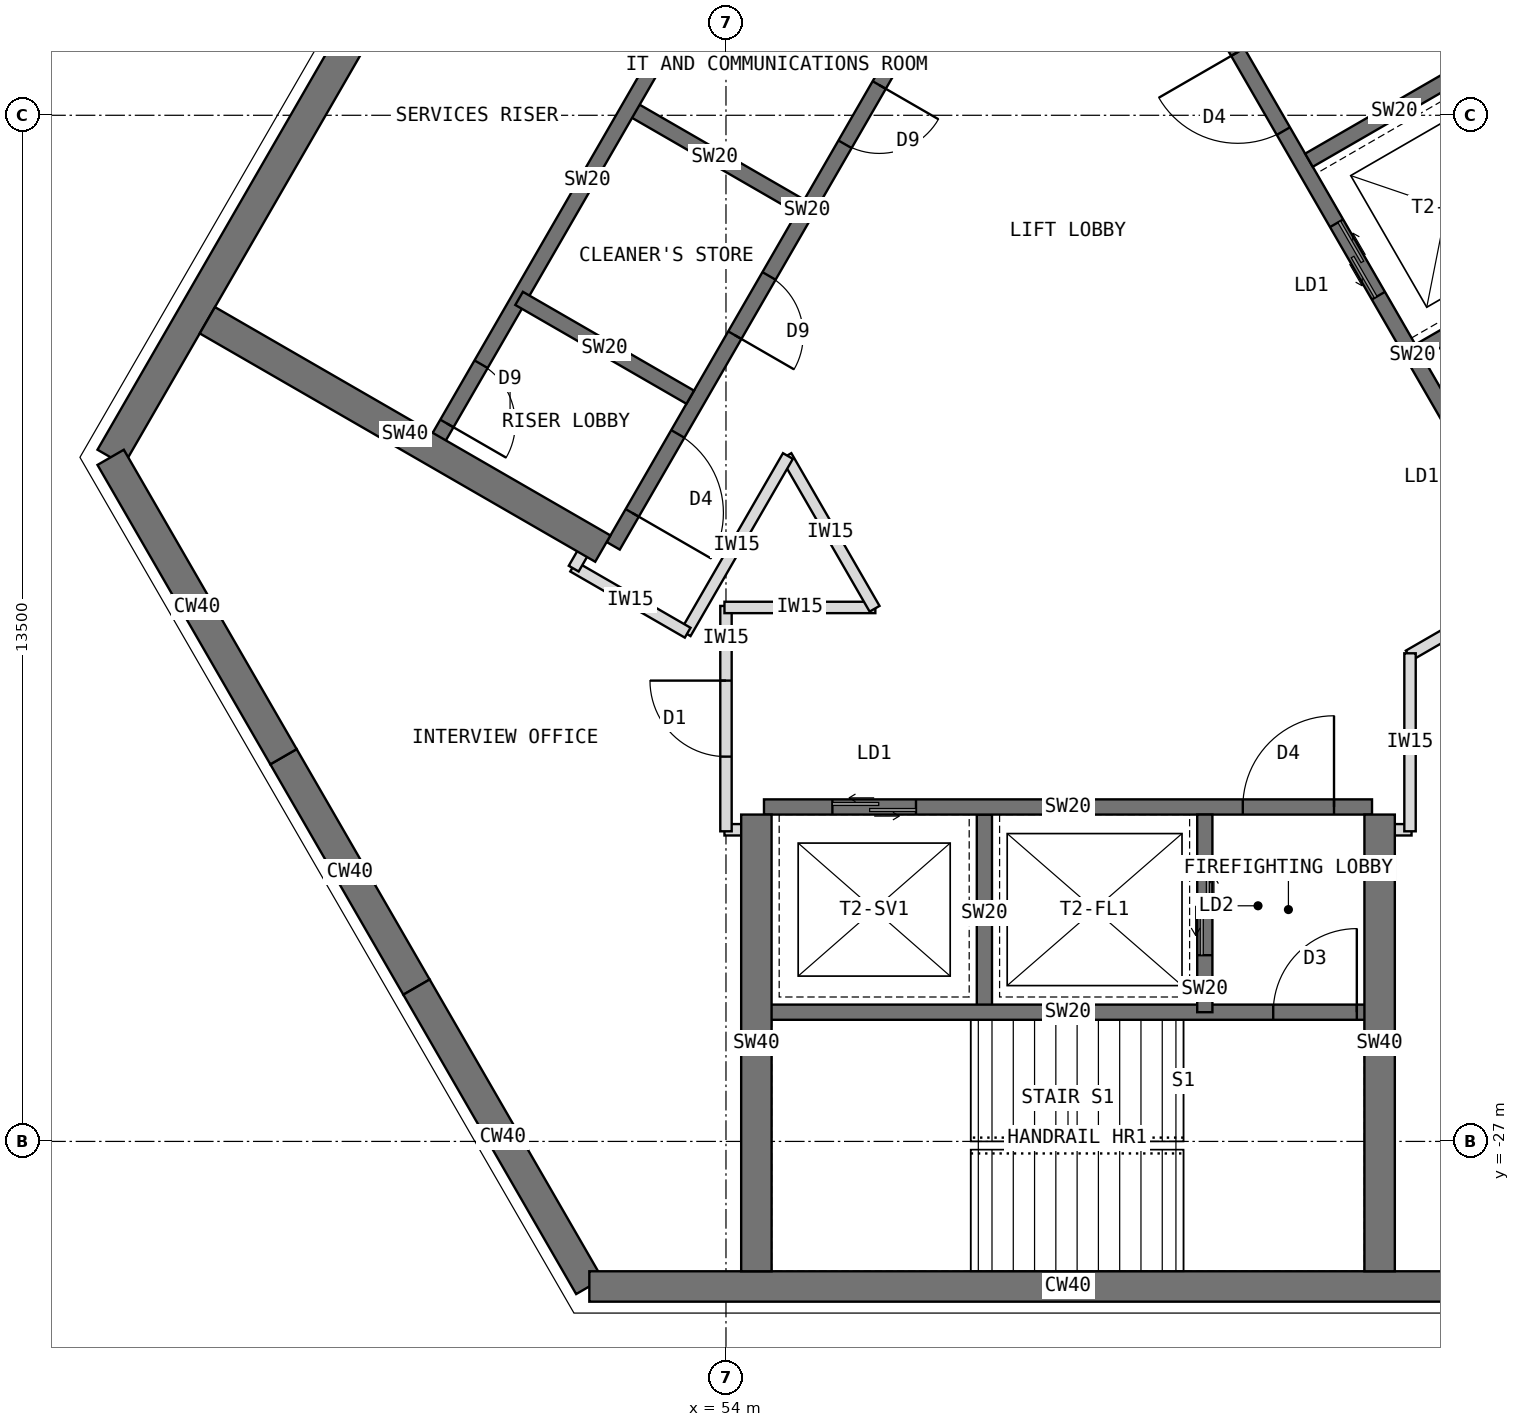
"""IFC4 building model, lengths in metres.
Left out: names, types, materials, properties, quantities, classifications, styles, units other than length and angle.
Written with IfcOpenShell. Run it as: python <this file> out.ifc"""

import sys

from ifc_helpers import new_model, si_unit, direction, frame, frame_2d, origin, place, context, subcontext, project, spatial, rectangle, extrude, element, fill, save


model = new_model("IFC4")
c1 = context("Model", 3, precision=1e-05, world=origin(), true_north=direction((0.0, 1.0)))
c2 = subcontext(c1, "Body", "Model", "MODEL_VIEW")
j1 = project(units=[si_unit("LENGTHUNIT", "METRE"), si_unit("PLANEANGLEUNIT", "RADIAN")], contexts=[c1])
p1 = place(None, origin())
s1 = spatial("IfcSite", under=j1, at=p1, CompositionType="ELEMENT")
p2 = place(p1, origin())
s2 = spatial("IfcBuilding", under=s1, at=p2, CompositionType="ELEMENT")
p3 = place(p2, frame((0.0, 0.0, 251.5)))
s3 = spatial("IfcBuildingStorey", under=s2, at=p3, CompositionType="ELEMENT", Elevation=251.5)
p4 = place(p3, frame((52.202, -7.092, 0.0), z_axis=(0.0, 0.0, 1.0), x_axis=(-0.500005998175, -0.866021940709, 0.0)))
e1 = element("IfcWall", 1, at=p4, inside=s3, PredefinedType="SHEAR", context=c2, shape_type="SweptSolid", body=[
    extrude(rectangle(XDim=12.596, YDim=0.4, at=frame_2d((6.298, 0.0))), origin(), (0.0, 0.0, 1.0), 4.0),
])
p5 = place(p3, frame((45.904, -18.0, 0.0), z_axis=(0.0, 0.0, 1.0), x_axis=(0.500024481964, -0.866011268655, 0.0)))
e2 = element("IfcWall", 2, at=p5, inside=s3, PredefinedType="SHEAR", context=c2, shape_type="SweptSolid", body=[
    extrude(rectangle(XDim=4.548, YDim=0.4, at=frame_2d((2.274, 0.0))), origin(), (0.0, 0.0, 1.0), 4.0),
])
p6 = place(p3, frame((48.178, -21.939, 0.0), z_axis=(0.0, 0.0, 1.0), x_axis=(0.500010275428, -0.866019471182, 0.0)))
e3 = element("IfcWall", 3, at=p6, inside=s3, PredefinedType="SHEAR", context=c2, shape_type="SweptSolid", body=[
    extrude(rectangle(XDim=3.5, YDim=0.4, at=frame_2d((1.75, 0.0))), origin(), (0.0, 0.0, 1.0), 4.0),
])
p7 = place(p3, frame((49.928, -24.97, 0.0), z_axis=(0.0, 0.0, 1.0), x_axis=(0.499984222037, -0.866034513004, 0.0)))
e4 = element("IfcWall", 4, at=p7, inside=s3, PredefinedType="SHEAR", context=c2, shape_type="SweptSolid", body=[
    extrude(rectangle(XDim=4.548, YDim=0.4, at=frame_2d((2.274, 0.0))), origin(), (0.0, 0.0, 1.0), 4.0),
])
p8 = place(p3, frame((52.202, -28.908, 0.0), z_axis=(0.0, 0.0, 1.0), x_axis=(1.0, 0.0, 0.0)))
e5 = element("IfcWall", 5, at=p8, inside=s3, PredefinedType="SHEAR", context=c2, shape_type="SweptSolid", body=[
    extrude(rectangle(XDim=12.596, YDim=0.4, at=frame_2d((6.298, 0.0))), origin(), (0.0, 0.0, 1.0), 4.0),
])
p9 = place(p3, frame((56.516, -12.236, 0.0), z_axis=(0.0, 0.0, 1.0), x_axis=(-0.49999894854, -0.866026010844, 0.0)))
e6 = element("IfcWall", 6, at=p9, inside=s3, PredefinedType="SHEAR", context=c2, shape_type="SweptSolid", body=[
    extrude(rectangle(XDim=8.0, YDim=0.2, at=frame_2d((4.0, 0.0))), origin(), (0.0, 0.0, 1.0), 4.0),
])
p10 = place(p9, frame((6.3, 0.0, 0.0)))
e7 = element("IfcOpeningElement", 7, at=p10, cuts=e6, PredefinedType="OPENING", context=c2, shape_type="SweptSolid", body=[
    extrude(rectangle(XDim=1.2, YDim=2.1, at=frame_2d((0.6, 1.05))), frame((0.0, 0.11, 0.0), z_axis=(0.0, -1.0, 0.0), x_axis=(1.0, 0.0, 0.0)), (0.0, 0.0, 1.0), 0.22),
])
p11 = place(p9, frame((1.0, 0.0, 0.0)))
e8 = element("IfcOpeningElement", 8, at=p11, cuts=e6, PredefinedType="OPENING", context=c2, shape_type="SweptSolid", body=[
    extrude(rectangle(XDim=0.9, YDim=2.1, at=frame_2d((0.45, 1.05))), frame((0.0, 0.11, 0.0), z_axis=(0.0, -1.0, 0.0), x_axis=(1.0, 0.0, 0.0)), (0.0, 0.0, 1.0), 0.22),
])
p12 = place(p9, frame((3.9, 0.0, 0.0)))
e9 = element("IfcOpeningElement", 9, at=p12, cuts=e6, PredefinedType="OPENING", context=c2, shape_type="SweptSolid", body=[
    extrude(rectangle(XDim=0.9, YDim=2.1, at=frame_2d((0.45, 1.05))), frame((0.0, 0.11, 0.0), z_axis=(0.0, -1.0, 0.0), x_axis=(1.0, 0.0, 0.0)), (0.0, 0.0, 1.0), 0.22),
])
for number, where, z_axis, x_axis in (
    (10, (54.98, -14.697, 0.0), (0.0, 0.0, 1.0), (-0.866, 0.5, 0.0)),
    (11, (53.53, -17.209, 0.0), (0.0, 0.0, 1.0), (-0.866, 0.5, 0.0)),
):
    element("IfcWall", number, at=place(p3, frame(where, z_axis=z_axis, x_axis=x_axis)), inside=s3, PredefinedType="SHEAR", context=c2, shape_type="SweptSolid", body=[
        extrude(rectangle(XDim=2.6, YDim=0.2, at=frame_2d((1.3, 0.0))), origin(), (0.0, 0.0, 1.0), 4.0),
    ])
p13 = place(p3, frame((54.178, -10.886, 0.0), z_axis=(0.0, 0.0, 1.0), x_axis=(-0.49999894854, -0.866026010844, 0.0)))
e12 = element("IfcWall", 12, at=p13, inside=s3, PredefinedType="SHEAR", context=c2, shape_type="SweptSolid", body=[
    extrude(rectangle(XDim=8.0, YDim=0.2, at=frame_2d((4.0, 0.0))), origin(), (0.0, 0.0, 1.0), 4.0),
])
p14 = place(p13, frame((6.8, 0.0, 0.0)))
e13 = element("IfcOpeningElement", 13, at=p14, cuts=e12, PredefinedType="OPENING", context=c2, shape_type="SweptSolid", body=[
    extrude(rectangle(XDim=0.9, YDim=2.1, at=frame_2d((0.45, 1.05))), frame((0.0, 0.11, 0.0), z_axis=(0.0, -1.0, 0.0), x_axis=(1.0, 0.0, 0.0)), (0.0, 0.0, 1.0), 0.22),
])
p15 = place(p3, frame((52.38, -19.201, 0.0), z_axis=(0.0, 0.0, 1.0), x_axis=(-0.866026570101, 0.499997979876, 0.0)))
e14 = element("IfcWall", 14, at=p15, inside=s3, PredefinedType="SHEAR", context=c2, shape_type="SweptSolid", body=[
    extrude(rectangle(XDim=6.008, YDim=0.4, at=frame_2d((3.004, 0.0))), origin(), (0.0, 0.0, 1.0), 4.0),
])
p16 = place(p3, frame((54.5, -22.6, 0.0), z_axis=(0.0, 0.0, 1.0), x_axis=(1.0, 0.0, 0.0)))
e15 = element("IfcWall", 15, at=p16, inside=s3, PredefinedType="SHEAR", context=c2, shape_type="SweptSolid", body=[
    extrude(rectangle(XDim=8.0, YDim=0.2, at=frame_2d((4.0, 0.0))), origin(), (0.0, 0.0, 1.0), 4.0),
])
p17 = place(p16, frame((6.3, 0.0, 0.0)))
e16 = element("IfcOpeningElement", 16, at=p17, cuts=e15, PredefinedType="OPENING", context=c2, shape_type="SweptSolid", body=[
    extrude(rectangle(XDim=1.2, YDim=2.1, at=frame_2d((0.6, 1.05))), frame((0.0, 0.11, 0.0), z_axis=(0.0, -1.0, 0.0), x_axis=(1.0, 0.0, 0.0)), (0.0, 0.0, 1.0), 0.22),
])
p18 = place(p16, frame((0.9, 0.0, 0.0)))
e17 = element("IfcOpeningElement", 17, at=p18, cuts=e15, PredefinedType="OPENING", context=c2, shape_type="SweptSolid", body=[
    extrude(rectangle(XDim=1.1, YDim=2.2, at=frame_2d((0.55, 1.1))), frame((0.0, 0.11, 0.0), z_axis=(0.0, -1.0, 0.0), x_axis=(1.0, 0.0, 0.0)), (0.0, 0.0, 1.0), 0.22),
])
p19 = place(p3, frame((57.4, -22.7, 0.0), z_axis=(0.0, 0.0, 1.0), x_axis=(0.0, -1.0, 0.0)))
e18 = element("IfcWall", 18, at=p19, inside=s3, PredefinedType="SHEAR", context=c2, shape_type="SweptSolid", body=[
    extrude(rectangle(XDim=2.6, YDim=0.2, at=frame_2d((1.3, 0.0))), origin(), (0.0, 0.0, 1.0), 4.0),
])
p20 = place(p3, frame((60.3, -22.7, 0.0), z_axis=(0.0, 0.0, 1.0), x_axis=(0.0, -1.0, 0.0)))
e19 = element("IfcWall", 19, at=p20, inside=s3, PredefinedType="SHEAR", context=c2, shape_type="SweptSolid", body=[
    extrude(rectangle(XDim=2.6, YDim=0.2, at=frame_2d((1.3, 0.0))), origin(), (0.0, 0.0, 1.0), 4.0),
])
p21 = place(p20, frame((0.55, 0.0, 0.0)))
e20 = element("IfcOpeningElement", 20, at=p21, cuts=e19, PredefinedType="OPENING", context=c2, shape_type="SweptSolid", body=[
    extrude(rectangle(XDim=1.3, YDim=2.2, at=frame_2d((0.65, 1.1))), frame((0.0, 0.11, 0.0), z_axis=(0.0, -1.0, 0.0), x_axis=(1.0, 0.0, 0.0)), (0.0, 0.0, 1.0), 0.22),
])
p22 = place(p3, frame((54.5, -25.3, 0.0), z_axis=(0.0, 0.0, 1.0), x_axis=(1.0, 0.0, 0.0)))
e21 = element("IfcWall", 21, at=p22, inside=s3, PredefinedType="SHEAR", context=c2, shape_type="SweptSolid", body=[
    extrude(rectangle(XDim=8.0, YDim=0.2, at=frame_2d((4.0, 0.0))), origin(), (0.0, 0.0, 1.0), 4.0),
])
p23 = place(p22, frame((6.7, 0.0, 0.0)))
e22 = element("IfcOpeningElement", 22, at=p23, cuts=e21, PredefinedType="OPENING", context=c2, shape_type="SweptSolid", body=[
    extrude(rectangle(XDim=1.1, YDim=2.1, at=frame_2d((0.55, 1.05))), frame((0.0, 0.11, 0.0), z_axis=(0.0, -1.0, 0.0), x_axis=(1.0, 0.0, 0.0)), (0.0, 0.0, 1.0), 0.22),
])
for number, where, z_axis, x_axis in (
    (23, (62.6, -22.7, 0.0), (0.0, 0.0, 1.0), (0.0, -1.0, 0.0)),
    (24, (54.4, -22.7, 0.0), (0.0, 0.0, 1.0), (0.0, -1.0, 0.0)),
):
    element("IfcWall", number, at=place(p3, frame(where, z_axis=z_axis, x_axis=x_axis)), inside=s3, PredefinedType="SHEAR", context=c2, shape_type="SweptSolid", body=[
        extrude(rectangle(XDim=6.008, YDim=0.4, at=frame_2d((3.004, 0.0))), origin(), (0.0, 0.0, 1.0), 4.0),
    ])
p24 = place(p3, frame((64.484, -19.164, 0.0), z_axis=(0.0, 0.0, 1.0), x_axis=(-0.49999894854, 0.866026010844, 0.0)))
e25 = element("IfcWall", 25, at=p24, inside=s3, PredefinedType="SHEAR", context=c2, shape_type="SweptSolid", body=[
    extrude(rectangle(XDim=8.0, YDim=0.2, at=frame_2d((4.0, 0.0))), origin(), (0.0, 0.0, 1.0), 4.0),
])
p25 = place(p24, frame((6.3, 0.0, 0.0)))
e26 = element("IfcOpeningElement", 26, at=p25, cuts=e25, PredefinedType="OPENING", context=c2, shape_type="SweptSolid", body=[
    extrude(rectangle(XDim=1.2, YDim=2.1, at=frame_2d((0.6, 1.05))), frame((0.0, 0.11, 0.0), z_axis=(0.0, -1.0, 0.0), x_axis=(1.0, 0.0, 0.0)), (0.0, 0.0, 1.0), 0.22),
])
p26 = place(p24, frame((0.9, 0.0, 0.0)))
e27 = element("IfcOpeningElement", 27, at=p26, cuts=e25, PredefinedType="OPENING", context=c2, shape_type="SweptSolid", body=[
    extrude(rectangle(XDim=1.1, YDim=2.2, at=frame_2d((0.55, 1.1))), frame((0.0, 0.11, 0.0), z_axis=(0.0, -1.0, 0.0), x_axis=(1.0, 0.0, 0.0)), (0.0, 0.0, 1.0), 0.22),
])
p27 = place(p24, frame((3.8, 0.0, 0.0)))
e28 = element("IfcOpeningElement", 28, at=p27, cuts=e25, PredefinedType="OPENING", context=c2, shape_type="SweptSolid", body=[
    extrude(rectangle(XDim=1.1, YDim=2.2, at=frame_2d((0.55, 1.1))), frame((0.0, 0.11, 0.0), z_axis=(0.0, -1.0, 0.0), x_axis=(1.0, 0.0, 0.0)), (0.0, 0.0, 1.0), 0.22),
])
p28 = place(p3, frame((63.12, -16.603, 0.0), z_axis=(0.0, 0.0, 1.0), x_axis=(0.866062058628, 0.499936506574, 0.0)))
e29 = element("IfcWall", 29, at=p28, inside=s3, PredefinedType="SHEAR", context=c2, shape_type="SweptSolid", body=[
    extrude(rectangle(XDim=2.6, YDim=0.2, at=frame_2d((1.3, 0.0))), origin(), (0.0, 0.0, 1.0), 4.0),
])
p29 = place(p3, frame((61.67, -14.091, 0.0), z_axis=(0.0, 0.0, 1.0), x_axis=(0.86603858612, 0.49997716683, 0.0)))
e30 = element("IfcWall", 30, at=p29, inside=s3, PredefinedType="SHEAR", context=c2, shape_type="SweptSolid", body=[
    extrude(rectangle(XDim=2.6, YDim=0.2, at=frame_2d((1.3, 0.0))), origin(), (0.0, 0.0, 1.0), 4.0),
])
p30 = place(p3, frame((66.822, -17.814, 0.0), z_axis=(0.0, 0.0, 1.0), x_axis=(-0.49999894854, 0.866026010844, 0.0)))
e31 = element("IfcWall", 31, at=p30, inside=s3, PredefinedType="SHEAR", context=c2, shape_type="SweptSolid", body=[
    extrude(rectangle(XDim=8.0, YDim=0.2, at=frame_2d((4.0, 0.0))), origin(), (0.0, 0.0, 1.0), 4.0),
])
p31 = place(p30, frame((6.7, 0.0, 0.0)))
e32 = element("IfcOpeningElement", 32, at=p31, cuts=e31, PredefinedType="OPENING", context=c2, shape_type="SweptSolid", body=[
    extrude(rectangle(XDim=1.1, YDim=2.1, at=frame_2d((0.55, 1.05))), frame((0.0, 0.11, 0.0), z_axis=(0.0, -1.0, 0.0), x_axis=(1.0, 0.0, 0.0)), (0.0, 0.0, 1.0), 0.22),
])
for number, where, z_axis, x_axis in (
    (33, (63.02, -22.9, 0.0), (0.0, 0.0, 1.0), (-1.0, 0.0, 0.0)),
    (34, (54.41, -22.9, 0.0), (0.0, 0.0, 1.0), (-1.0, 0.0, 0.0)),
):
    element("IfcWall", number, at=place(p3, frame(where, z_axis=z_axis, x_axis=x_axis)), inside=s3, PredefinedType="PARTITIONING", context=c2, shape_type="SweptSolid", body=[
        extrude(rectangle(XDim=0.43, YDim=0.15, at=frame_2d((0.215, 0.0))), origin(), (0.0, 0.0, 1.0), 3.8),
    ])
p32 = place(p3, frame((54.0, -22.92, 0.0), z_axis=(0.0, 0.0, 1.0), x_axis=(0.0, 1.0, 0.0)))
e35 = element("IfcWall", 35, at=p32, inside=s3, PredefinedType="PARTITIONING", context=c2, shape_type="SweptSolid", body=[
    extrude(rectangle(XDim=2.965, YDim=0.15, at=frame_2d((1.482, 0.0))), origin(), (0.0, 0.0, 1.0), 3.8),
])
p33 = place(p32, frame((0.982, 0.0, 0.0)))
e36 = element("IfcOpeningElement", 36, at=p33, cuts=e35, PredefinedType="OPENING", context=c2, shape_type="SweptSolid", body=[
    extrude(rectangle(XDim=1.0, YDim=2.1, at=frame_2d((0.5, 1.05))), frame((0.0, 0.085, 0.0), z_axis=(0.0, -1.0, 0.0), x_axis=(1.0, 0.0, 0.0)), (0.0, 0.0, 1.0), 0.17),
])
p34 = place(p3, frame((53.98, -19.975, 0.0), z_axis=(0.0, 0.0, 1.0), x_axis=(1.0, 0.0, 0.0)))
e37 = element("IfcWall", 37, at=p34, inside=s3, PredefinedType="PARTITIONING", context=c2, shape_type="SweptSolid", body=[
    extrude(rectangle(XDim=1.985, YDim=0.15, at=frame_2d((0.993, 0.0))), origin(), (0.0, 0.0, 1.0), 3.8),
])
p35 = place(p3, frame((55.955, -19.992, 0.0), z_axis=(0.0, 0.0, 1.0), x_axis=(-0.499941024108, 0.866059450854, 0.0)))
e38 = element("IfcWall", 38, at=p35, inside=s3, PredefinedType="PARTITIONING", context=c2, shape_type="SweptSolid", body=[
    extrude(rectangle(XDim=2.321, YDim=0.15, at=frame_2d((1.16, 0.0))), origin(), (0.0, 0.0, 1.0), 3.8),
])
p36 = place(p3, frame((54.815, -17.983, 0.0), z_axis=(0.0, 0.0, 1.0), x_axis=(-0.499981473571, -0.866036099759, 0.0)))
e39 = element("IfcWall", 39, at=p36, inside=s3, PredefinedType="PARTITIONING", context=c2, shape_type="SweptSolid", body=[
    extrude(rectangle(XDim=2.692, YDim=0.15, at=frame_2d((1.346, 0.0))), origin(), (0.0, 0.0, 1.0), 3.8),
])
p37 = place(p3, frame((53.496, -20.307, 0.0), z_axis=(0.0, 0.0, 1.0), x_axis=(-0.865989304205, 0.500062521093, 0.0)))
e40 = element("IfcWall", 40, at=p37, inside=s3, PredefinedType="PARTITIONING", context=c2, shape_type="SweptSolid", body=[
    extrude(rectangle(XDim=1.74, YDim=0.15, at=frame_2d((0.87, 0.0))), origin(), (0.0, 0.0, 1.0), 3.8),
])
p38 = place(p3, frame((51.997, -19.464, 0.0), z_axis=(0.0, 0.0, 1.0), x_axis=(0.499804398801, 0.866138304741, 0.0)))
e41 = element("IfcWall", 41, at=p38, inside=s3, PredefinedType="PARTITIONING", context=c2, shape_type="SweptSolid", body=[
    extrude(rectangle(XDim=0.43, YDim=0.15, at=frame_2d((0.215, 0.0))), origin(), (0.0, 0.0, 1.0), 3.8),
])
p39 = place(p3, frame((65.011, -19.437, 0.0), z_axis=(0.0, 0.0, 1.0), x_axis=(-0.865982457891, -0.500074377092, 0.0)))
e42 = element("IfcWall", 42, at=p39, inside=s3, PredefinedType="PARTITIONING", context=c2, shape_type="SweptSolid", body=[
    extrude(rectangle(XDim=2.342, YDim=0.15, at=frame_2d((1.171, 0.0))), origin(), (0.0, 0.0, 1.0), 3.8),
])
p40 = place(p39, frame((0.671, 0.0, 0.0)))
e43 = element("IfcOpeningElement", 43, at=p40, cuts=e42, PredefinedType="OPENING", context=c2, shape_type="SweptSolid", body=[
    extrude(rectangle(XDim=1.0, YDim=2.1, at=frame_2d((0.5, 1.05))), frame((0.0, 0.085, 0.0), z_axis=(0.0, -1.0, 0.0), x_axis=(1.0, 0.0, 0.0)), (0.0, 0.0, 1.0), 0.17),
])
p41 = place(p3, frame((63.0, -20.578, 0.0), z_axis=(0.0, 0.0, 1.0), x_axis=(0.0, -1.0, 0.0)))
e44 = element("IfcWall", 44, at=p41, inside=s3, PredefinedType="PARTITIONING", context=c2, shape_type="SweptSolid", body=[
    extrude(rectangle(XDim=2.342, YDim=0.15, at=frame_2d((1.171, 0.0))), origin(), (0.0, 0.0, 1.0), 3.8),
])
p42 = place(p10, origin())
e45 = element("IfcDoor", 45, at=p42, inside=s3, OperationType="SINGLE_SWING_RIGHT", PredefinedType="DOOR", context=c2, shape_type="SweptSolid", body=[
    extrude(rectangle(XDim=1.2, YDim=2.1, at=frame_2d((0.6, 1.05))), frame((0.0, 0.025, 0.0), z_axis=(0.0, -1.0, 0.0), x_axis=(1.0, 0.0, 0.0)), (0.0, 0.0, 1.0), 0.05),
])
fill(e7, e45)
p43 = place(p14, origin())
e46 = element("IfcDoor", 46, at=p43, inside=s3, OperationType="SINGLE_SWING_RIGHT", PredefinedType="DOOR", context=c2, shape_type="SweptSolid", body=[
    extrude(rectangle(XDim=0.9, YDim=2.1, at=frame_2d((0.45, 1.05))), frame((0.0, 0.025, 0.0), z_axis=(0.0, -1.0, 0.0), x_axis=(1.0, 0.0, 0.0)), (0.0, 0.0, 1.0), 0.05),
])
fill(e13, e46)
p44 = place(p17, origin())
e47 = element("IfcDoor", 47, at=p44, inside=s3, OperationType="SINGLE_SWING_RIGHT", PredefinedType="DOOR", context=c2, shape_type="SweptSolid", body=[
    extrude(rectangle(XDim=1.2, YDim=2.1, at=frame_2d((0.6, 1.05))), frame((0.0, 0.025, 0.0), z_axis=(0.0, -1.0, 0.0), x_axis=(1.0, 0.0, 0.0)), (0.0, 0.0, 1.0), 0.05),
])
fill(e16, e47)
p45 = place(p21, origin())
e48 = element("IfcDoor", 48, at=p45, inside=s3, OperationType="DOUBLE_DOOR_SLIDING", PredefinedType="DOOR", context=c2, shape_type="SweptSolid", body=[
    extrude(rectangle(XDim=1.3, YDim=2.2, at=frame_2d((0.65, 1.1))), frame((0.0, 0.025, 0.0), z_axis=(0.0, -1.0, 0.0), x_axis=(1.0, 0.0, 0.0)), (0.0, 0.0, 1.0), 0.05),
])
fill(e20, e48)
p46 = place(p18, origin())
e49 = element("IfcDoor", 49, at=p46, inside=s3, OperationType="DOUBLE_DOOR_SLIDING", PredefinedType="DOOR", context=c2, shape_type="SweptSolid", body=[
    extrude(rectangle(XDim=1.1, YDim=2.2, at=frame_2d((0.55, 1.1))), frame((0.0, 0.025, 0.0), z_axis=(0.0, -1.0, 0.0), x_axis=(1.0, 0.0, 0.0)), (0.0, 0.0, 1.0), 0.05),
])
fill(e17, e49)
p47 = place(p23, origin())
e50 = element("IfcDoor", 50, at=p47, inside=s3, OperationType="SINGLE_SWING_RIGHT", PredefinedType="DOOR", context=c2, shape_type="SweptSolid", body=[
    extrude(rectangle(XDim=1.1, YDim=2.1, at=frame_2d((0.55, 1.05))), frame((0.0, 0.025, 0.0), z_axis=(0.0, -1.0, 0.0), x_axis=(1.0, 0.0, 0.0)), (0.0, 0.0, 1.0), 0.05),
])
fill(e22, e50)
p48 = place(p25, origin())
e51 = element("IfcDoor", 51, at=p48, inside=s3, OperationType="SINGLE_SWING_RIGHT", PredefinedType="DOOR", context=c2, shape_type="SweptSolid", body=[
    extrude(rectangle(XDim=1.2, YDim=2.1, at=frame_2d((0.6, 1.05))), frame((0.0, 0.025, 0.0), z_axis=(0.0, -1.0, 0.0), x_axis=(1.0, 0.0, 0.0)), (0.0, 0.0, 1.0), 0.05),
])
fill(e26, e51)
p49 = place(p27, origin())
e52 = element("IfcDoor", 52, at=p49, inside=s3, OperationType="DOUBLE_DOOR_SLIDING", PredefinedType="DOOR", context=c2, shape_type="SweptSolid", body=[
    extrude(rectangle(XDim=1.1, YDim=2.2, at=frame_2d((0.55, 1.1))), frame((0.0, 0.025, 0.0), z_axis=(0.0, -1.0, 0.0), x_axis=(1.0, 0.0, 0.0)), (0.0, 0.0, 1.0), 0.05),
])
fill(e28, e52)
p50 = place(p33, origin())
e53 = element("IfcDoor", 53, at=p50, inside=s3, OperationType="SINGLE_SWING_RIGHT", PredefinedType="DOOR", context=c2, shape_type="SweptSolid", body=[
    extrude(rectangle(XDim=1.0, YDim=2.1, at=frame_2d((0.5, 1.05))), frame((0.0, 0.025, 0.0), z_axis=(0.0, -1.0, 0.0), x_axis=(1.0, 0.0, 0.0)), (0.0, 0.0, 1.0), 0.05),
])
fill(e36, e53)
p51 = place(p11, origin())
e54 = element("IfcDoor", 54, at=p51, inside=s3, OperationType="SINGLE_SWING_LEFT", PredefinedType="DOOR", context=c2, shape_type="SweptSolid", body=[
    extrude(rectangle(XDim=0.9, YDim=2.1, at=frame_2d((0.45, 1.05))), frame((0.0, 0.025, 0.0), z_axis=(0.0, -1.0, 0.0), x_axis=(1.0, 0.0, 0.0)), (0.0, 0.0, 1.0), 0.05),
])
fill(e8, e54)
p52 = place(p12, origin())
e55 = element("IfcDoor", 55, at=p52, inside=s3, OperationType="SINGLE_SWING_RIGHT", PredefinedType="DOOR", context=c2, shape_type="SweptSolid", body=[
    extrude(rectangle(XDim=0.9, YDim=2.1, at=frame_2d((0.45, 1.05))), frame((0.0, 0.025, 0.0), z_axis=(0.0, -1.0, 0.0), x_axis=(1.0, 0.0, 0.0)), (0.0, 0.0, 1.0), 0.05),
])
fill(e9, e55)
save(model, sys.argv[1])
